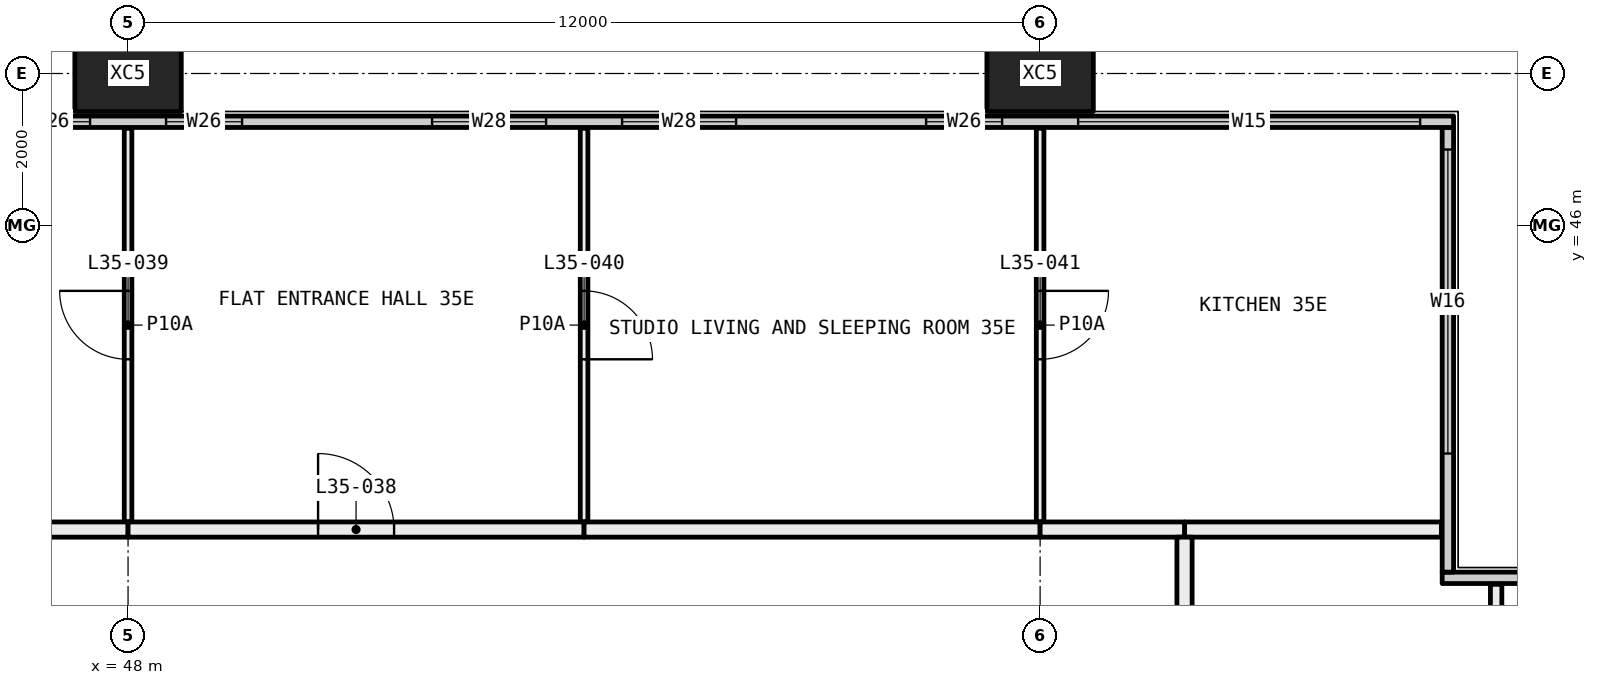
"""IFC4 building model, lengths in metres.
Left out: names, types, materials, properties, quantities, classifications, styles, units other than length and angle.
Written with IfcOpenShell. Run it as: python <this file> out.ifc"""

import sys

from ifc_helpers import new_model, si_unit, direction, frame, frame_2d, origin, origin_2d, place, context, subcontext, project, spatial, rectangle, hollow_rectangle, extrude, element, fill, save


model = new_model("IFC4")
c1 = context("Model", 3, precision=1e-05, world=origin(), true_north=direction((0.0, 1.0)))
c2 = subcontext(c1, "Body", "Model", "MODEL_VIEW")
j1 = project(units=[si_unit("LENGTHUNIT", "METRE"), si_unit("PLANEANGLEUNIT", "RADIAN")], contexts=[c1])
p1 = place(None, origin())
s1 = spatial("IfcSite", under=j1, at=p1, CompositionType="ELEMENT")
p2 = place(p1, origin())
s2 = spatial("IfcBuilding", under=s1, at=p2, CompositionType="ELEMENT")
p3 = place(p2, frame((0.0, 0.0, 134.55)))
s3 = spatial("IfcBuildingStorey", under=s2, at=p3, CompositionType="ELEMENT", Elevation=134.55)
for number, where, z_axis, x_axis in (
    (1, (48.0, 48.0, -0.4), (0.0, 0.0, 1.0), (1.0, 0.0, 0.0)),
    (2, (60.0, 48.0, -0.4), (0.0, 0.0, 1.0), (1.0, 0.0, 0.0)),
):
    element("IfcColumn", number, at=place(p3, frame(where, z_axis=z_axis, x_axis=x_axis)), inside=s3, PredefinedType="COLUMN", context=c2, shape_type="SweptSolid", body=[
        extrude(hollow_rectangle(XDim=1.4, YDim=1.0, WallThickness=0.055, at=origin_2d()), origin(), (0.0, 0.0, 1.0), 3.45),
    ])
p4 = place(p3, frame((65.29, 41.365, 0.0), z_axis=(0.0, 0.0, 1.0), x_axis=(1.0, 0.0, 0.0)))
e3 = element("IfcWall", 3, at=p4, inside=s3, PredefinedType="ELEMENTEDWALL", context=c2, shape_type="SweptSolid", body=[
    extrude(rectangle(XDim=6.15, YDim=0.15, at=frame_2d((3.075, 0.0))), origin(), (0.0, 0.0, 1.0), 3.05),
])
p5 = place(p4, frame((1.71, 0.0, 0.45)))
e4 = element("IfcOpeningElement", 4, at=p5, cuts=e3, PredefinedType="OPENING", context=c2, shape_type="SweptSolid", body=[
    extrude(rectangle(XDim=4.0, YDim=2.55, at=frame_2d((2.0, 1.275))), frame((0.0, 0.085, 0.0), z_axis=(0.0, -1.0, 0.0), x_axis=(1.0, 0.0, 0.0)), (0.0, 0.0, 1.0), 0.17),
])
p6 = place(p3, frame((65.365, 41.44, 0.0), z_axis=(0.0, 0.0, 1.0), x_axis=(0.0, 1.0, 0.0)))
e5 = element("IfcWall", 5, at=p6, inside=s3, PredefinedType="ELEMENTEDWALL", context=c2, shape_type="SweptSolid", body=[
    extrude(rectangle(XDim=5.85, YDim=0.15, at=frame_2d((2.925, 0.0))), origin(), (0.0, 0.0, 1.0), 3.05),
])
p7 = place(p6, frame((1.56, 0.0, 0.45)))
e6 = element("IfcOpeningElement", 6, at=p7, cuts=e5, PredefinedType="OPENING", context=c2, shape_type="SweptSolid", body=[
    extrude(rectangle(XDim=4.0, YDim=2.55, at=frame_2d((2.0, 1.275))), frame((0.0, 0.085, 0.0), z_axis=(0.0, -1.0, 0.0), x_axis=(1.0, 0.0, 0.0)), (0.0, 0.0, 1.0), 0.17),
])
p8 = place(p3, frame((6.56, 47.365, 0.0), z_axis=(0.0, 0.0, 1.0), x_axis=(1.0, 0.0, 0.0)))
e7 = element("IfcWall", 7, at=p8, inside=s3, PredefinedType="ELEMENTEDWALL", context=c2, shape_type="SweptSolid", body=[
    extrude(rectangle(XDim=58.88, YDim=0.15, at=frame_2d((29.44, 0.0))), origin(), (0.0, 0.0, 1.0), 3.05),
])
p9 = place(p8, frame((0.44, 0.0, 0.45)))
e8 = element("IfcOpeningElement", 8, at=p9, cuts=e7, PredefinedType="OPENING", context=c2, shape_type="SweptSolid", body=[
    extrude(rectangle(XDim=4.5, YDim=2.55, at=frame_2d((2.25, 1.275))), frame((0.0, 0.085, 0.0), z_axis=(0.0, -1.0, 0.0), x_axis=(1.0, 0.0, 0.0)), (0.0, 0.0, 1.0), 0.17),
])
p10 = place(p8, frame((5.94, 0.0, 0.45)))
e9 = element("IfcOpeningElement", 9, at=p10, cuts=e7, PredefinedType="OPENING", context=c2, shape_type="SweptSolid", body=[
    extrude(rectangle(XDim=1.0, YDim=2.55, at=frame_2d((0.5, 1.275))), frame((0.0, 0.085, 0.0), z_axis=(0.0, -1.0, 0.0), x_axis=(1.0, 0.0, 0.0)), (0.0, 0.0, 1.0), 0.17),
])
p11 = place(p8, frame((9.44, 0.0, 0.45)))
e10 = element("IfcOpeningElement", 10, at=p11, cuts=e7, PredefinedType="OPENING", context=c2, shape_type="SweptSolid", body=[
    extrude(rectangle(XDim=1.5, YDim=2.55, at=frame_2d((0.75, 1.275))), frame((0.0, 0.085, 0.0), z_axis=(0.0, -1.0, 0.0), x_axis=(1.0, 0.0, 0.0)), (0.0, 0.0, 1.0), 0.17),
])
p12 = place(p8, frame((11.94, 0.0, 0.45)))
e11 = element("IfcOpeningElement", 11, at=p12, cuts=e7, PredefinedType="OPENING", context=c2, shape_type="SweptSolid", body=[
    extrude(rectangle(XDim=1.5, YDim=2.55, at=frame_2d((0.75, 1.275))), frame((0.0, 0.085, 0.0), z_axis=(0.0, -1.0, 0.0), x_axis=(1.0, 0.0, 0.0)), (0.0, 0.0, 1.0), 0.17),
])
p13 = place(p8, frame((15.94, 0.0, 0.45)))
e12 = element("IfcOpeningElement", 12, at=p13, cuts=e7, PredefinedType="OPENING", context=c2, shape_type="SweptSolid", body=[
    extrude(rectangle(XDim=1.0, YDim=2.55, at=frame_2d((0.5, 1.275))), frame((0.0, 0.085, 0.0), z_axis=(0.0, -1.0, 0.0), x_axis=(1.0, 0.0, 0.0)), (0.0, 0.0, 1.0), 0.17),
])
p14 = place(p8, frame((17.94, 0.0, 0.45)))
e13 = element("IfcOpeningElement", 13, at=p14, cuts=e7, PredefinedType="OPENING", context=c2, shape_type="SweptSolid", body=[
    extrude(rectangle(XDim=1.0, YDim=2.55, at=frame_2d((0.5, 1.275))), frame((0.0, 0.085, 0.0), z_axis=(0.0, -1.0, 0.0), x_axis=(1.0, 0.0, 0.0)), (0.0, 0.0, 1.0), 0.17),
])
p15 = place(p8, frame((21.44, 0.0, 0.45)))
e14 = element("IfcOpeningElement", 14, at=p15, cuts=e7, PredefinedType="OPENING", context=c2, shape_type="SweptSolid", body=[
    extrude(rectangle(XDim=1.5, YDim=2.55, at=frame_2d((0.75, 1.275))), frame((0.0, 0.085, 0.0), z_axis=(0.0, -1.0, 0.0), x_axis=(1.0, 0.0, 0.0)), (0.0, 0.0, 1.0), 0.17),
])
p16 = place(p8, frame((23.94, 0.0, 0.45)))
e15 = element("IfcOpeningElement", 15, at=p16, cuts=e7, PredefinedType="OPENING", context=c2, shape_type="SweptSolid", body=[
    extrude(rectangle(XDim=1.5, YDim=2.55, at=frame_2d((0.75, 1.275))), frame((0.0, 0.085, 0.0), z_axis=(0.0, -1.0, 0.0), x_axis=(1.0, 0.0, 0.0)), (0.0, 0.0, 1.0), 0.17),
])
p17 = place(p8, frame((27.94, 0.0, 0.45)))
e16 = element("IfcOpeningElement", 16, at=p17, cuts=e7, PredefinedType="OPENING", context=c2, shape_type="SweptSolid", body=[
    extrude(rectangle(XDim=1.0, YDim=2.55, at=frame_2d((0.5, 1.275))), frame((0.0, 0.085, 0.0), z_axis=(0.0, -1.0, 0.0), x_axis=(1.0, 0.0, 0.0)), (0.0, 0.0, 1.0), 0.17),
])
p18 = place(p8, frame((29.94, 0.0, 0.45)))
e17 = element("IfcOpeningElement", 17, at=p18, cuts=e7, PredefinedType="OPENING", context=c2, shape_type="SweptSolid", body=[
    extrude(rectangle(XDim=1.0, YDim=2.55, at=frame_2d((0.5, 1.275))), frame((0.0, 0.085, 0.0), z_axis=(0.0, -1.0, 0.0), x_axis=(1.0, 0.0, 0.0)), (0.0, 0.0, 1.0), 0.17),
])
p19 = place(p8, frame((33.44, 0.0, 0.45)))
e18 = element("IfcOpeningElement", 18, at=p19, cuts=e7, PredefinedType="OPENING", context=c2, shape_type="SweptSolid", body=[
    extrude(rectangle(XDim=1.5, YDim=2.55, at=frame_2d((0.75, 1.275))), frame((0.0, 0.085, 0.0), z_axis=(0.0, -1.0, 0.0), x_axis=(1.0, 0.0, 0.0)), (0.0, 0.0, 1.0), 0.17),
])
p20 = place(p8, frame((35.94, 0.0, 0.45)))
e19 = element("IfcOpeningElement", 19, at=p20, cuts=e7, PredefinedType="OPENING", context=c2, shape_type="SweptSolid", body=[
    extrude(rectangle(XDim=1.5, YDim=2.55, at=frame_2d((0.75, 1.275))), frame((0.0, 0.085, 0.0), z_axis=(0.0, -1.0, 0.0), x_axis=(1.0, 0.0, 0.0)), (0.0, 0.0, 1.0), 0.17),
])
p21 = place(p8, frame((39.94, 0.0, 0.45)))
e20 = element("IfcOpeningElement", 20, at=p21, cuts=e7, PredefinedType="OPENING", context=c2, shape_type="SweptSolid", body=[
    extrude(rectangle(XDim=1.0, YDim=2.55, at=frame_2d((0.5, 1.275))), frame((0.0, 0.085, 0.0), z_axis=(0.0, -1.0, 0.0), x_axis=(1.0, 0.0, 0.0)), (0.0, 0.0, 1.0), 0.17),
])
p22 = place(p8, frame((41.94, 0.0, 0.45)))
e21 = element("IfcOpeningElement", 21, at=p22, cuts=e7, PredefinedType="OPENING", context=c2, shape_type="SweptSolid", body=[
    extrude(rectangle(XDim=1.0, YDim=2.55, at=frame_2d((0.5, 1.275))), frame((0.0, 0.085, 0.0), z_axis=(0.0, -1.0, 0.0), x_axis=(1.0, 0.0, 0.0)), (0.0, 0.0, 1.0), 0.17),
])
p23 = place(p8, frame((45.44, 0.0, 0.45)))
e22 = element("IfcOpeningElement", 22, at=p23, cuts=e7, PredefinedType="OPENING", context=c2, shape_type="SweptSolid", body=[
    extrude(rectangle(XDim=1.5, YDim=2.55, at=frame_2d((0.75, 1.275))), frame((0.0, 0.085, 0.0), z_axis=(0.0, -1.0, 0.0), x_axis=(1.0, 0.0, 0.0)), (0.0, 0.0, 1.0), 0.17),
])
p24 = place(p8, frame((47.94, 0.0, 0.45)))
e23 = element("IfcOpeningElement", 23, at=p24, cuts=e7, PredefinedType="OPENING", context=c2, shape_type="SweptSolid", body=[
    extrude(rectangle(XDim=1.5, YDim=2.55, at=frame_2d((0.75, 1.275))), frame((0.0, 0.085, 0.0), z_axis=(0.0, -1.0, 0.0), x_axis=(1.0, 0.0, 0.0)), (0.0, 0.0, 1.0), 0.17),
])
p25 = place(p8, frame((51.94, 0.0, 0.45)))
e24 = element("IfcOpeningElement", 24, at=p25, cuts=e7, PredefinedType="OPENING", context=c2, shape_type="SweptSolid", body=[
    extrude(rectangle(XDim=1.0, YDim=2.55, at=frame_2d((0.5, 1.275))), frame((0.0, 0.085, 0.0), z_axis=(0.0, -1.0, 0.0), x_axis=(1.0, 0.0, 0.0)), (0.0, 0.0, 1.0), 0.17),
])
p26 = place(p8, frame((53.94, 0.0, 0.45)))
e25 = element("IfcOpeningElement", 25, at=p26, cuts=e7, PredefinedType="OPENING", context=c2, shape_type="SweptSolid", body=[
    extrude(rectangle(XDim=4.5, YDim=2.55, at=frame_2d((2.25, 1.275))), frame((0.0, 0.085, 0.0), z_axis=(0.0, -1.0, 0.0), x_axis=(1.0, 0.0, 0.0)), (0.0, 0.0, 1.0), 0.17),
])
p27 = place(p3, frame((48.0, 42.1, 0.0), z_axis=(0.0, 0.0, 1.0), x_axis=(0.0, 1.0, 0.0)))
e26 = element("IfcWall", 26, at=p27, inside=s3, PredefinedType="PARTITIONING", context=c2, shape_type="SweptSolid", body=[
    extrude(rectangle(XDim=5.18, YDim=0.1, at=frame_2d((2.59, 0.0))), origin(), (0.0, 0.0, 1.0), 3.05),
])
p28 = place(p27, frame((2.14, 0.0, 0.0)))
e27 = element("IfcOpeningElement", 27, at=p28, cuts=e26, PredefinedType="OPENING", context=c2, shape_type="SweptSolid", body=[
    extrude(rectangle(XDim=0.9, YDim=2.1, at=frame_2d((0.45, 1.05))), frame((0.0, 0.06, 0.0), z_axis=(0.0, -1.0, 0.0), x_axis=(1.0, 0.0, 0.0)), (0.0, 0.0, 1.0), 0.12),
])
p29 = place(p3, frame((46.1, 42.0, 0.0), z_axis=(0.0, 0.0, 1.0), x_axis=(1.0, 0.0, 0.0)))
e28 = element("IfcWall", 28, at=p29, inside=s3, PredefinedType="PARTITIONING", context=c2, shape_type="SweptSolid", body=[
    extrude(rectangle(XDim=1.9, YDim=0.2, at=frame_2d((0.95, 0.0))), origin(), (0.0, 0.0, 1.0), 3.05),
])
p30 = place(p3, frame((54.0, 42.1, 0.0), z_axis=(0.0, 0.0, 1.0), x_axis=(0.0, 1.0, 0.0)))
e29 = element("IfcWall", 29, at=p30, inside=s3, PredefinedType="PARTITIONING", context=c2, shape_type="SweptSolid", body=[
    extrude(rectangle(XDim=5.18, YDim=0.1, at=frame_2d((2.59, 0.0))), origin(), (0.0, 0.0, 1.0), 3.05),
])
p31 = place(p30, frame((2.14, 0.0, 0.0)))
e30 = element("IfcOpeningElement", 30, at=p31, cuts=e29, PredefinedType="OPENING", context=c2, shape_type="SweptSolid", body=[
    extrude(rectangle(XDim=0.9, YDim=2.1, at=frame_2d((0.45, 1.05))), frame((0.0, 0.06, 0.0), z_axis=(0.0, -1.0, 0.0), x_axis=(1.0, 0.0, 0.0)), (0.0, 0.0, 1.0), 0.12),
])
p32 = place(p3, frame((48.0, 42.0, 0.0), z_axis=(0.0, 0.0, 1.0), x_axis=(1.0, 0.0, 0.0)))
e31 = element("IfcWall", 31, at=p32, inside=s3, PredefinedType="PARTITIONING", context=c2, shape_type="SweptSolid", body=[
    extrude(rectangle(XDim=6.0, YDim=0.2, at=frame_2d((3.0, 0.0))), origin(), (0.0, 0.0, 1.0), 3.05),
])
p33 = place(p32, frame((2.5, 0.0, 0.0)))
e32 = element("IfcOpeningElement", 32, at=p33, cuts=e31, PredefinedType="OPENING", context=c2, shape_type="SweptSolid", body=[
    extrude(rectangle(XDim=1.0, YDim=2.1, at=frame_2d((0.5, 1.05))), frame((0.0, 0.11, 0.0), z_axis=(0.0, -1.0, 0.0), x_axis=(1.0, 0.0, 0.0)), (0.0, 0.0, 1.0), 0.22),
])
p34 = place(p3, frame((60.0, 42.1, 0.0), z_axis=(0.0, 0.0, 1.0), x_axis=(0.0, 1.0, 0.0)))
e33 = element("IfcWall", 33, at=p34, inside=s3, PredefinedType="PARTITIONING", context=c2, shape_type="SweptSolid", body=[
    extrude(rectangle(XDim=5.18, YDim=0.1, at=frame_2d((2.59, 0.0))), origin(), (0.0, 0.0, 1.0), 3.05),
])
p35 = place(p34, frame((2.14, 0.0, 0.0)))
e34 = element("IfcOpeningElement", 34, at=p35, cuts=e33, PredefinedType="OPENING", context=c2, shape_type="SweptSolid", body=[
    extrude(rectangle(XDim=0.9, YDim=2.1, at=frame_2d((0.45, 1.05))), frame((0.0, 0.06, 0.0), z_axis=(0.0, -1.0, 0.0), x_axis=(1.0, 0.0, 0.0)), (0.0, 0.0, 1.0), 0.12),
])
p36 = place(p3, frame((54.0, 42.0, 0.0), z_axis=(0.0, 0.0, 1.0), x_axis=(1.0, 0.0, 0.0)))
e35 = element("IfcWall", 35, at=p36, inside=s3, PredefinedType="PARTITIONING", context=c2, shape_type="SweptSolid", body=[
    extrude(rectangle(XDim=6.0, YDim=0.2, at=frame_2d((3.0, 0.0))), origin(), (0.0, 0.0, 1.0), 3.05),
])
p37 = place(p3, frame((61.9, 42.0, 0.0), z_axis=(0.0, 0.0, 1.0), x_axis=(1.0, 0.0, 0.0)))
e36 = element("IfcWall", 36, at=p37, inside=s3, PredefinedType="PARTITIONING", context=c2, shape_type="SweptSolid", body=[
    extrude(rectangle(XDim=3.38, YDim=0.2, at=frame_2d((1.69, 0.0))), origin(), (0.0, 0.0, 1.0), 3.05),
])
p38 = place(p3, frame((60.0, 42.0, 0.0), z_axis=(0.0, 0.0, 1.0), x_axis=(1.0, 0.0, 0.0)))
e37 = element("IfcWall", 37, at=p38, inside=s3, PredefinedType="PARTITIONING", context=c2, shape_type="SweptSolid", body=[
    extrude(rectangle(XDim=1.9, YDim=0.2, at=frame_2d((0.95, 0.0))), origin(), (0.0, 0.0, 1.0), 3.05),
])
p39 = place(p3, frame((66.0, 41.28, 0.0), z_axis=(0.0, 0.0, 1.0), x_axis=(0.0, -1.0, 0.0)))
e38 = element("IfcWall", 38, at=p39, inside=s3, PredefinedType="PARTITIONING", context=c2, shape_type="SweptSolid", body=[
    extrude(rectangle(XDim=2.28, YDim=0.15, at=frame_2d((1.14, 0.0))), origin(), (0.0, 0.0, 1.0), 3.05),
])
p40 = place(p3, frame((61.9, 41.9, 0.0), z_axis=(0.0, 0.0, 1.0), x_axis=(0.0, -1.0, 0.0)))
e39 = element("IfcWall", 39, at=p40, inside=s3, PredefinedType="PARTITIONING", context=c2, shape_type="SweptSolid", body=[
    extrude(rectangle(XDim=2.9, YDim=0.2, at=frame_2d((1.45, 0.0))), origin(), (0.0, 0.0, 1.0), 3.05),
])
p41 = place(p7, origin())
e40 = element("IfcWindow", 40, at=p41, inside=s3, PartitioningType="SINGLE_PANEL", PredefinedType="WINDOW", context=c2, shape_type="SweptSolid", body=[
    extrude(rectangle(XDim=4.0, YDim=2.55, at=frame_2d((2.0, 1.275))), frame((0.0, 0.03, 0.0), z_axis=(0.0, -1.0, 0.0), x_axis=(1.0, 0.0, 0.0)), (0.0, 0.0, 1.0), 0.06),
])
fill(e6, e40)
p42 = place(p21, origin())
e41 = element("IfcWindow", 41, at=p42, inside=s3, PartitioningType="SINGLE_PANEL", PredefinedType="WINDOW", context=c2, shape_type="SweptSolid", body=[
    extrude(rectangle(XDim=1.0, YDim=2.55, at=frame_2d((0.5, 1.275))), frame((0.0, 0.03, 0.0), z_axis=(0.0, -1.0, 0.0), x_axis=(1.0, 0.0, 0.0)), (0.0, 0.0, 1.0), 0.06),
])
fill(e20, e41)
p43 = place(p22, origin())
e42 = element("IfcWindow", 42, at=p43, inside=s3, PartitioningType="SINGLE_PANEL", PredefinedType="WINDOW", context=c2, shape_type="SweptSolid", body=[
    extrude(rectangle(XDim=1.0, YDim=2.55, at=frame_2d((0.5, 1.275))), frame((0.0, 0.03, 0.0), z_axis=(0.0, -1.0, 0.0), x_axis=(1.0, 0.0, 0.0)), (0.0, 0.0, 1.0), 0.06),
])
fill(e21, e42)
p44 = place(p23, origin())
e43 = element("IfcWindow", 43, at=p44, inside=s3, PartitioningType="SINGLE_PANEL", PredefinedType="WINDOW", context=c2, shape_type="SweptSolid", body=[
    extrude(rectangle(XDim=1.5, YDim=2.55, at=frame_2d((0.75, 1.275))), frame((0.0, 0.03, 0.0), z_axis=(0.0, -1.0, 0.0), x_axis=(1.0, 0.0, 0.0)), (0.0, 0.0, 1.0), 0.06),
])
fill(e22, e43)
p45 = place(p24, origin())
e44 = element("IfcWindow", 44, at=p45, inside=s3, PartitioningType="SINGLE_PANEL", PredefinedType="WINDOW", context=c2, shape_type="SweptSolid", body=[
    extrude(rectangle(XDim=1.5, YDim=2.55, at=frame_2d((0.75, 1.275))), frame((0.0, 0.03, 0.0), z_axis=(0.0, -1.0, 0.0), x_axis=(1.0, 0.0, 0.0)), (0.0, 0.0, 1.0), 0.06),
])
fill(e23, e44)
p46 = place(p25, origin())
e45 = element("IfcWindow", 45, at=p46, inside=s3, PartitioningType="SINGLE_PANEL", PredefinedType="WINDOW", context=c2, shape_type="SweptSolid", body=[
    extrude(rectangle(XDim=1.0, YDim=2.55, at=frame_2d((0.5, 1.275))), frame((0.0, 0.03, 0.0), z_axis=(0.0, -1.0, 0.0), x_axis=(1.0, 0.0, 0.0)), (0.0, 0.0, 1.0), 0.06),
])
fill(e24, e45)
p47 = place(p26, origin())
e46 = element("IfcWindow", 46, at=p47, inside=s3, PartitioningType="SINGLE_PANEL", PredefinedType="WINDOW", context=c2, shape_type="SweptSolid", body=[
    extrude(rectangle(XDim=4.5, YDim=2.55, at=frame_2d((2.25, 1.275))), frame((0.0, 0.03, 0.0), z_axis=(0.0, -1.0, 0.0), x_axis=(1.0, 0.0, 0.0)), (0.0, 0.0, 1.0), 0.06),
])
fill(e25, e46)
p48 = place(p33, origin())
e47 = element("IfcDoor", 47, at=p48, inside=s3, OperationType="SINGLE_SWING_RIGHT", PredefinedType="DOOR", context=c2, shape_type="SweptSolid", body=[
    extrude(rectangle(XDim=1.0, YDim=2.1, at=frame_2d((0.5, 1.05))), frame((0.0, 0.025, 0.0), z_axis=(0.0, -1.0, 0.0), x_axis=(1.0, 0.0, 0.0)), (0.0, 0.0, 1.0), 0.05),
])
fill(e32, e47)
p49 = place(p28, origin())
e48 = element("IfcDoor", 48, at=p49, inside=s3, OperationType="SINGLE_SWING_LEFT", PredefinedType="DOOR", context=c2, shape_type="SweptSolid", body=[
    extrude(rectangle(XDim=0.9, YDim=2.1, at=frame_2d((0.45, 1.05))), frame((0.0, 0.025, 0.0), z_axis=(0.0, -1.0, 0.0), x_axis=(1.0, 0.0, 0.0)), (0.0, 0.0, 1.0), 0.05),
])
fill(e27, e48)
p50 = place(p31, frame((0.9, 0.0, 0.0), x_axis=(-1.0, 0.0, 0.0)))
e49 = element("IfcDoor", 49, at=p50, inside=s3, OperationType="SINGLE_SWING_LEFT", PredefinedType="DOOR", context=c2, shape_type="SweptSolid", body=[
    extrude(rectangle(XDim=0.9, YDim=2.1, at=frame_2d((0.45, 1.05))), frame((0.0, 0.025, 0.0), z_axis=(0.0, -1.0, 0.0), x_axis=(1.0, 0.0, 0.0)), (0.0, 0.0, 1.0), 0.05),
])
fill(e30, e49)
p51 = place(p35, frame((0.9, 0.0, 0.0), x_axis=(-1.0, 0.0, 0.0)))
e50 = element("IfcDoor", 50, at=p51, inside=s3, OperationType="SINGLE_SWING_RIGHT", PredefinedType="DOOR", context=c2, shape_type="SweptSolid", body=[
    extrude(rectangle(XDim=0.9, YDim=2.1, at=frame_2d((0.45, 1.05))), frame((0.0, 0.025, 0.0), z_axis=(0.0, -1.0, 0.0), x_axis=(1.0, 0.0, 0.0)), (0.0, 0.0, 1.0), 0.05),
])
fill(e34, e50)
save(model, sys.argv[1])
